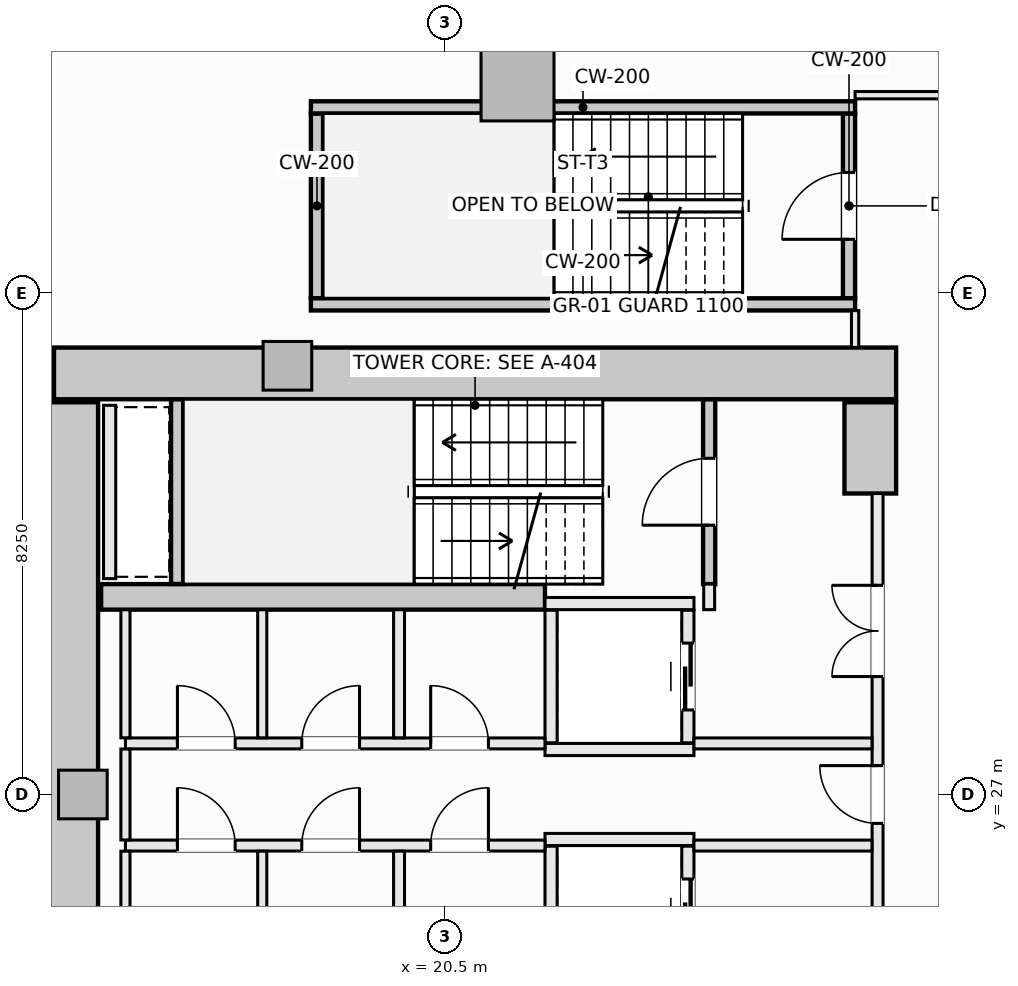
"""IFC4 building model, lengths in metres.
Left out: names, types, materials, properties, quantities, classifications, styles, units other than length and angle.
Written with IfcOpenShell. Run it as: python <this file> out.ifc"""

import sys

from ifc_helpers import new_model, si_unit, direction, frame, frame_2d, origin, origin_2d, place, context, subcontext, project, spatial, rectangle, extrude, element, fill, save


model = new_model("IFC4")
c1 = context("Model", 3, precision=1e-05, world=origin(), true_north=direction((0.0, 1.0)))
c2 = subcontext(c1, "Body", "Model", "MODEL_VIEW")
j1 = project(units=[si_unit("LENGTHUNIT", "METRE"), si_unit("PLANEANGLEUNIT", "RADIAN")], contexts=[c1])
p1 = place(None, origin())
s1 = spatial("IfcSite", under=j1, at=p1, CompositionType="ELEMENT")
p2 = place(p1, origin())
s2 = spatial("IfcBuilding", under=s1, at=p2, CompositionType="ELEMENT")
p3 = place(p2, frame((0.0, 0.0, 72.7)))
s3 = spatial("IfcBuildingStorey", under=s2, at=p3, CompositionType="ELEMENT", Elevation=72.7)
p4 = place(p3, frame((14.075, 33.925, -0.28), z_axis=(0.0, 0.0, 1.0), x_axis=(1.0, 0.0, 0.0)))
e1 = element("IfcWall", 1, at=p4, inside=s3, PredefinedType="SHEAR", context=c2, shape_type="SweptSolid", body=[
    extrude(rectangle(XDim=13.85, YDim=0.85, at=frame_2d((6.925, 0.0))), origin(), (0.0, 0.0, 1.0), 3.85),
])
p5 = place(p3, frame((14.375, 20.55, -0.28), z_axis=(0.0, 0.0, 1.0), x_axis=(0.0, 1.0, 0.0)))
e2 = element("IfcWall", 2, at=p5, inside=s3, PredefinedType="SHEAR", context=c2, shape_type="SweptSolid", body=[
    extrude(rectangle(XDim=12.9, YDim=0.85, at=frame_2d((6.45, 0.0))), origin(), (0.0, 0.0, 1.0), 3.85),
])
p6 = place(p3, frame((27.5, 31.95, -0.28), z_axis=(0.0, 0.0, 1.0), x_axis=(0.0, 1.0, 0.0)))
e3 = element("IfcWall", 3, at=p6, inside=s3, PredefinedType="SHEAR", context=c2, shape_type="SweptSolid", body=[
    extrude(rectangle(XDim=1.5, YDim=0.85, at=frame_2d((0.75, 0.0))), origin(), (0.0, 0.0, 1.0), 3.85),
])
p7 = place(p3, frame((14.85, 30.25, -0.28), z_axis=(0.0, 0.0, 1.0), x_axis=(1.0, 0.0, 0.0)))
e4 = element("IfcWall", 4, at=p7, inside=s3, PredefinedType="SHEAR", context=c2, shape_type="SweptSolid", body=[
    extrude(rectangle(XDim=7.3, YDim=0.42, at=frame_2d((3.65, 0.0))), origin(), (0.0, 0.0, 1.0), 3.85),
])
p8 = place(p3, frame((21.698, 38.677, -0.28), z_axis=(0.0, 0.0, 1.0), x_axis=(1.0, 0.0, 0.0)))
e5 = element("IfcColumn", 5, at=p8, inside=s3, PredefinedType="COLUMN", context=c2, shape_type="SweptSolid", body=[
    extrude(rectangle(XDim=1.2, YDim=1.2, at=origin_2d()), origin(), (0.0, 0.0, 1.0), 3.85),
])
for number, where, z_axis, x_axis in (
    (6, (17.914, 34.05, -0.28), (0.0, 0.0, 1.0), (1.0, 0.0, 0.0)),
    (7, (14.55, 27.0, -0.28), (0.0, 0.0, 1.0), (1.0, 0.0, 0.0)),
):
    element("IfcColumn", number, at=place(p3, frame(where, z_axis=z_axis, x_axis=x_axis)), inside=s3, PredefinedType="PILASTER", context=c2, shape_type="SweptSolid", body=[
        extrude(rectangle(XDim=0.8, YDim=0.8, at=origin_2d()), origin(), (0.0, 0.0, 1.0), 3.85),
    ])
p9 = place(p3, frame((24.85, 30.46, -0.28), z_axis=(0.0, 0.0, 1.0), x_axis=(0.0, 1.0, 0.0)))
e8 = element("IfcWall", 8, at=p9, inside=s3, PredefinedType="SHEAR", context=c2, shape_type="SweptSolid", body=[
    extrude(rectangle(XDim=3.038, YDim=0.2, at=frame_2d((1.519, 0.0))), origin(), (0.0, 0.0, 1.0), 3.85),
])
p10 = place(p9, frame((0.969, 0.0, 0.28)))
e9 = element("IfcOpeningElement", 9, at=p10, cuts=e8, PredefinedType="OPENING", context=c2, shape_type="SweptSolid", body=[
    extrude(rectangle(XDim=1.1, YDim=2.15, at=frame_2d((0.55, 1.075))), frame((0.0, 0.11, 0.0), z_axis=(0.0, -1.0, 0.0), x_axis=(1.0, 0.0, 0.0)), (0.0, 0.0, 1.0), 0.22),
])
p11 = place(p3, frame((16.1, 30.462, -0.28), z_axis=(0.0, 0.0, 1.0), x_axis=(0.0, 1.0, 0.0)))
e10 = element("IfcWall", 10, at=p11, inside=s3, PredefinedType="SHEAR", context=c2, shape_type="SweptSolid", body=[
    extrude(rectangle(XDim=3.036, YDim=0.2, at=frame_2d((1.518, 0.0))), origin(), (0.0, 0.0, 1.0), 3.85),
])
p12 = place(p3, frame((27.15, 35.16, -0.28), z_axis=(0.0, 0.0, 1.0), x_axis=(0.0, 1.0, 0.0)))
e11 = element("IfcWall", 11, at=p12, inside=s3, PredefinedType="SHEAR", context=c2, shape_type="SweptSolid", body=[
    extrude(rectangle(XDim=3.04, YDim=0.2, at=frame_2d((1.52, 0.0))), origin(), (0.0, 0.0, 1.0), 3.85),
])
p13 = place(p12, frame((0.97, 0.0, 0.28)))
e12 = element("IfcOpeningElement", 12, at=p13, cuts=e11, PredefinedType="OPENING", context=c2, shape_type="SweptSolid", body=[
    extrude(rectangle(XDim=1.1, YDim=2.15, at=frame_2d((0.55, 1.075))), frame((0.0, 0.11, 0.0), z_axis=(0.0, -1.0, 0.0), x_axis=(1.0, 0.0, 0.0)), (0.0, 0.0, 1.0), 0.22),
])
p14 = place(p3, frame((18.4, 35.16, -0.28), z_axis=(0.0, 0.0, 1.0), x_axis=(0.0, 1.0, 0.0)))
e13 = element("IfcWall", 13, at=p14, inside=s3, PredefinedType="SHEAR", context=c2, shape_type="SweptSolid", body=[
    extrude(rectangle(XDim=3.04, YDim=0.2, at=frame_2d((1.52, 0.0))), origin(), (0.0, 0.0, 1.0), 3.85),
])
for number, where, z_axis, x_axis in (
    (14, (18.3, 38.3, -0.28), (0.0, 0.0, 1.0), (1.0, 0.0, 0.0)),
    (15, (18.3, 35.06, -0.28), (0.0, 0.0, 1.0), (1.0, 0.0, 0.0)),
):
    element("IfcWall", number, at=place(p3, frame(where, z_axis=z_axis, x_axis=x_axis)), inside=s3, PredefinedType="SHEAR", context=c2, shape_type="SweptSolid", body=[
        extrude(rectangle(XDim=8.95, YDim=0.2, at=frame_2d((4.475, 0.0))), origin(), (0.0, 0.0, 1.0), 3.85),
    ])
for number, where, z_axis, x_axis in (
    (16, (22.15, 30.14, 0.0), (0.0, 0.0, 1.0), (1.0, 0.0, 0.0)),
    (17, (22.15, 27.74, 0.0), (0.0, 0.0, 1.0), (1.0, 0.0, 0.0)),
):
    element("IfcWall", number, at=place(p3, frame(where, z_axis=z_axis, x_axis=x_axis)), inside=s3, PredefinedType="SOLIDWALL", context=c2, shape_type="SweptSolid", body=[
        extrude(rectangle(XDim=2.45, YDim=0.2, at=frame_2d((1.225, 0.0))), origin(), (0.0, 0.0, 1.0), 3.57),
    ])
p15 = place(p3, frame((22.25, 27.85, 0.0), z_axis=(0.0, 0.0, 1.0), x_axis=(0.0, 1.0, 0.0)))
e18 = element("IfcWall", 18, at=p15, inside=s3, PredefinedType="SOLIDWALL", context=c2, shape_type="SweptSolid", body=[
    extrude(rectangle(XDim=2.18, YDim=0.2, at=frame_2d((1.09, 0.0))), origin(), (0.0, 0.0, 1.0), 3.57),
])
p16 = place(p3, frame((24.5, 27.85, 0.0), z_axis=(0.0, 0.0, 1.0), x_axis=(0.0, 1.0, 0.0)))
e19 = element("IfcWall", 19, at=p16, inside=s3, PredefinedType="SOLIDWALL", context=c2, shape_type="SweptSolid", body=[
    extrude(rectangle(XDim=2.18, YDim=0.2, at=frame_2d((1.09, 0.0))), origin(), (0.0, 0.0, 1.0), 3.57),
])
p17 = place(p16, frame((0.54, 0.0, 0.0)))
e20 = element("IfcOpeningElement", 20, at=p17, cuts=e19, PredefinedType="OPENING", context=c2, shape_type="SweptSolid", body=[
    extrude(rectangle(XDim=1.1, YDim=2.2, at=frame_2d((0.55, 1.1))), frame((0.0, 0.11, 0.0), z_axis=(0.0, -1.0, 0.0), x_axis=(1.0, 0.0, 0.0)), (0.0, 0.0, 1.0), 0.22),
])
p18 = place(p3, frame((22.15, 26.26, 0.0), z_axis=(0.0, 0.0, 1.0), x_axis=(1.0, 0.0, 0.0)))
e21 = element("IfcWall", 21, at=p18, inside=s3, PredefinedType="SOLIDWALL", context=c2, shape_type="SweptSolid", body=[
    extrude(rectangle(XDim=2.45, YDim=0.2, at=frame_2d((1.225, 0.0))), origin(), (0.0, 0.0, 1.0), 3.57),
])
p19 = place(p3, frame((22.25, 23.97, 0.0), z_axis=(0.0, 0.0, 1.0), x_axis=(0.0, 1.0, 0.0)))
e22 = element("IfcWall", 22, at=p19, inside=s3, PredefinedType="SOLIDWALL", context=c2, shape_type="SweptSolid", body=[
    extrude(rectangle(XDim=2.18, YDim=0.2, at=frame_2d((1.09, 0.0))), origin(), (0.0, 0.0, 1.0), 3.57),
])
p20 = place(p3, frame((24.5, 23.97, 0.0), z_axis=(0.0, 0.0, 1.0), x_axis=(0.0, 1.0, 0.0)))
e23 = element("IfcWall", 23, at=p20, inside=s3, PredefinedType="SOLIDWALL", context=c2, shape_type="SweptSolid", body=[
    extrude(rectangle(XDim=2.18, YDim=0.2, at=frame_2d((1.09, 0.0))), origin(), (0.0, 0.0, 1.0), 3.57),
])
p21 = place(p20, frame((0.54, 0.0, 0.0)))
e24 = element("IfcOpeningElement", 24, at=p21, cuts=e23, PredefinedType="OPENING", context=c2, shape_type="SweptSolid", body=[
    extrude(rectangle(XDim=1.1, YDim=2.2, at=frame_2d((0.55, 1.1))), frame((0.0, 0.11, 0.0), z_axis=(0.0, -1.0, 0.0), x_axis=(1.0, 0.0, 0.0)), (0.0, 0.0, 1.0), 0.22),
])
p22 = place(p3, frame((14.99, 30.55, 0.0), z_axis=(0.0, 0.0, 1.0), x_axis=(0.0, 1.0, 0.0)))
e25 = element("IfcWall", 25, at=p22, inside=s3, PredefinedType="SOLIDWALL", context=c2, shape_type="SweptSolid", body=[
    extrude(rectangle(XDim=2.85, YDim=0.2, at=frame_2d((1.425, 0.0))), origin(), (0.0, 0.0, 1.0), 3.57),
])
p23 = place(p3, frame((24.85, 30.04, 0.0), z_axis=(0.0, 0.0, 1.0), x_axis=(0.0, 1.0, 0.0)))
e26 = element("IfcWall", 26, at=p23, inside=s3, PredefinedType="SOLIDWALL", context=c2, shape_type="SweptSolid", body=[
    extrude(rectangle(XDim=0.42, YDim=0.18, at=frame_2d((0.21, 0.0))), origin(), (0.0, 0.0, 1.0), 3.57),
])
p24 = place(p3, frame((27.62, 22.05, 0.0), z_axis=(0.0, 0.0, 1.0), x_axis=(0.0, 1.0, 0.0)))
e27 = element("IfcWall", 27, at=p24, inside=s3, PredefinedType="SOLIDWALL", context=c2, shape_type="SweptSolid", body=[
    extrude(rectangle(XDim=9.9, YDim=0.18, at=frame_2d((4.95, 0.0))), origin(), (0.0, 0.0, 1.0), 2.662),
])
p25 = place(p24, frame((4.475, 0.0, 0.0)))
e28 = element("IfcOpeningElement", 28, at=p25, cuts=e27, PredefinedType="OPENING", context=c2, shape_type="SweptSolid", body=[
    extrude(rectangle(XDim=0.95, YDim=2.1, at=frame_2d((0.475, 1.05))), frame((0.0, 0.1, 0.0), z_axis=(0.0, -1.0, 0.0), x_axis=(1.0, 0.0, 0.0)), (0.0, 0.0, 1.0), 0.2),
])
p26 = place(p24, frame((6.89, 0.0, 0.0)))
e29 = element("IfcOpeningElement", 29, at=p26, cuts=e27, PredefinedType="OPENING", context=c2, shape_type="SweptSolid", body=[
    extrude(rectangle(XDim=1.5, YDim=2.2, at=frame_2d((0.75, 1.1))), frame((0.0, 0.1, 0.0), z_axis=(0.0, -1.0, 0.0), x_axis=(1.0, 0.0, 0.0)), (0.0, 0.0, 1.0), 0.2),
])
p27 = place(p24, frame((1.51, 0.0, 0.0)))
e30 = element("IfcOpeningElement", 30, at=p27, cuts=e27, PredefinedType="OPENING", context=c2, shape_type="SweptSolid", body=[
    extrude(rectangle(XDim=1.5, YDim=2.2, at=frame_2d((0.75, 1.1))), frame((0.0, 0.1, 0.0), z_axis=(0.0, -1.0, 0.0), x_axis=(1.0, 0.0, 0.0)), (0.0, 0.0, 1.0), 0.2),
])
p28 = place(p3, frame((15.25, 27.84, 0.0), z_axis=(0.0, 0.0, 1.0), x_axis=(1.0, 0.0, 0.0)))
e31 = element("IfcWall", 31, at=p28, inside=s3, PredefinedType="SOLIDWALL", context=c2, shape_type="SweptSolid", body=[
    extrude(rectangle(XDim=6.9, YDim=0.18, at=frame_2d((3.45, 0.0))), origin(), (0.0, 0.0, 1.0), 3.57),
])
p29 = place(p28, frame((5.02, 0.0, 0.0)))
e32 = element("IfcOpeningElement", 32, at=p29, cuts=e31, PredefinedType="OPENING", context=c2, shape_type="SweptSolid", body=[
    extrude(rectangle(XDim=0.95, YDim=2.1, at=frame_2d((0.475, 1.05))), frame((0.0, 0.1, 0.0), z_axis=(0.0, -1.0, 0.0), x_axis=(1.0, 0.0, 0.0)), (0.0, 0.0, 1.0), 0.2),
])
p30 = place(p28, frame((0.855, 0.0, 0.0)))
e33 = element("IfcOpeningElement", 33, at=p30, cuts=e31, PredefinedType="OPENING", context=c2, shape_type="SweptSolid", body=[
    extrude(rectangle(XDim=0.95, YDim=2.1, at=frame_2d((0.475, 1.05))), frame((0.0, 0.1, 0.0), z_axis=(0.0, -1.0, 0.0), x_axis=(1.0, 0.0, 0.0)), (0.0, 0.0, 1.0), 0.2),
])
p31 = place(p28, frame((2.9, 0.0, 0.0)))
e34 = element("IfcOpeningElement", 34, at=p31, cuts=e31, PredefinedType="OPENING", context=c2, shape_type="SweptSolid", body=[
    extrude(rectangle(XDim=0.95, YDim=2.1, at=frame_2d((0.475, 1.05))), frame((0.0, 0.1, 0.0), z_axis=(0.0, -1.0, 0.0), x_axis=(1.0, 0.0, 0.0)), (0.0, 0.0, 1.0), 0.2),
])
p32 = place(p3, frame((24.6, 27.84, 0.0), z_axis=(0.0, 0.0, 1.0), x_axis=(1.0, 0.0, 0.0)))
e35 = element("IfcWall", 35, at=p32, inside=s3, PredefinedType="SOLIDWALL", context=c2, shape_type="SweptSolid", body=[
    extrude(rectangle(XDim=2.928, YDim=0.18, at=frame_2d((1.464, 0.0))), origin(), (0.0, 0.0, 1.0), 3.57),
])
p33 = place(p3, frame((15.25, 26.16, 0.0), z_axis=(0.0, 0.0, 1.0), x_axis=(1.0, 0.0, 0.0)))
e36 = element("IfcWall", 36, at=p33, inside=s3, PredefinedType="SOLIDWALL", context=c2, shape_type="SweptSolid", body=[
    extrude(rectangle(XDim=6.9, YDim=0.18, at=frame_2d((3.45, 0.0))), origin(), (0.0, 0.0, 1.0), 3.57),
])
p34 = place(p33, frame((5.02, 0.0, 0.0)))
e37 = element("IfcOpeningElement", 37, at=p34, cuts=e36, PredefinedType="OPENING", context=c2, shape_type="SweptSolid", body=[
    extrude(rectangle(XDim=0.95, YDim=2.1, at=frame_2d((0.475, 1.05))), frame((0.0, 0.1, 0.0), z_axis=(0.0, -1.0, 0.0), x_axis=(1.0, 0.0, 0.0)), (0.0, 0.0, 1.0), 0.2),
])
p35 = place(p33, frame((0.855, 0.0, 0.0)))
e38 = element("IfcOpeningElement", 38, at=p35, cuts=e36, PredefinedType="OPENING", context=c2, shape_type="SweptSolid", body=[
    extrude(rectangle(XDim=0.95, YDim=2.1, at=frame_2d((0.475, 1.05))), frame((0.0, 0.1, 0.0), z_axis=(0.0, -1.0, 0.0), x_axis=(1.0, 0.0, 0.0)), (0.0, 0.0, 1.0), 0.2),
])
p36 = place(p33, frame((2.9, 0.0, 0.0)))
e39 = element("IfcOpeningElement", 39, at=p36, cuts=e36, PredefinedType="OPENING", context=c2, shape_type="SweptSolid", body=[
    extrude(rectangle(XDim=0.95, YDim=2.1, at=frame_2d((0.475, 1.05))), frame((0.0, 0.1, 0.0), z_axis=(0.0, -1.0, 0.0), x_axis=(1.0, 0.0, 0.0)), (0.0, 0.0, 1.0), 0.2),
])
p37 = place(p3, frame((24.6, 26.16, 0.0), z_axis=(0.0, 0.0, 1.0), x_axis=(1.0, 0.0, 0.0)))
e40 = element("IfcWall", 40, at=p37, inside=s3, PredefinedType="SOLIDWALL", context=c2, shape_type="SweptSolid", body=[
    extrude(rectangle(XDim=2.928, YDim=0.18, at=frame_2d((1.464, 0.0))), origin(), (0.0, 0.0, 1.0), 3.57),
])
p38 = place(p3, frame((15.25, 23.962, 0.0), z_axis=(0.0, 0.0, 1.0), x_axis=(0.0, 1.0, 0.0)))
e41 = element("IfcWall", 41, at=p38, inside=s3, PredefinedType="PARTITIONING", context=c2, shape_type="SweptSolid", body=[
    extrude(rectangle(XDim=2.106, YDim=0.15, at=frame_2d((1.053, 0.0))), origin(), (0.0, 0.0, 1.0), 3.57),
])
p39 = place(p3, frame((15.25, 26.252, 0.0), z_axis=(0.0, 0.0, 1.0), x_axis=(0.0, 1.0, 0.0)))
e42 = element("IfcWall", 42, at=p39, inside=s3, PredefinedType="PARTITIONING", context=c2, shape_type="SweptSolid", body=[
    extrude(rectangle(XDim=1.496, YDim=0.15, at=frame_2d((0.748, 0.0))), origin(), (0.0, 0.0, 1.0), 3.57),
])
p40 = place(p3, frame((15.25, 27.932, 0.0), z_axis=(0.0, 0.0, 1.0), x_axis=(0.0, 1.0, 0.0)))
e43 = element("IfcWall", 43, at=p40, inside=s3, PredefinedType="PARTITIONING", context=c2, shape_type="SweptSolid", body=[
    extrude(rectangle(XDim=2.106, YDim=0.15, at=frame_2d((1.053, 0.0))), origin(), (0.0, 0.0, 1.0), 3.57),
])
for number, where, z_axis, x_axis in (
    (44, (19.75, 23.962, 0.0), (0.0, 0.0, 1.0), (0.0, 1.0, 0.0)),
    (45, (19.75, 27.932, 0.0), (0.0, 0.0, 1.0), (0.0, 1.0, 0.0)),
):
    element("IfcWall", number, at=place(p3, frame(where, z_axis=z_axis, x_axis=x_axis)), inside=s3, PredefinedType="SOLIDWALL", context=c2, shape_type="SweptSolid", body=[
        extrude(rectangle(XDim=2.106, YDim=0.18, at=frame_2d((1.053, 0.0))), origin(), (0.0, 0.0, 1.0), 3.57),
    ])
for number, where, z_axis, x_axis in (
    (46, (17.5, 23.962, 0.0), (0.0, 0.0, 1.0), (0.0, 1.0, 0.0)),
    (47, (17.5, 27.932, 0.0), (0.0, 0.0, 1.0), (0.0, 1.0, 0.0)),
):
    element("IfcWall", number, at=place(p3, frame(where, z_axis=z_axis, x_axis=x_axis)), inside=s3, PredefinedType="PARTITIONING", context=c2, shape_type="SweptSolid", body=[
        extrude(rectangle(XDim=2.106, YDim=0.15, at=frame_2d((1.053, 0.0))), origin(), (0.0, 0.0, 1.0), 3.57),
    ])
p41 = place(p3, frame((27.25, 34.352, 0.0), z_axis=(0.0, 0.0, 1.0), x_axis=(0.0, 1.0, 0.0)))
e48 = element("IfcWall", 48, at=p41, inside=s3, PredefinedType="PARTITIONING", context=c2, shape_type="SweptSolid", body=[
    extrude(rectangle(XDim=0.606, YDim=0.12, at=frame_2d((0.303, 0.0))), origin(), (0.0, 0.0, 1.0), 3.57),
])
p42 = place(p3, frame((27.25, 38.5, 0.0), z_axis=(0.0, 0.0, 1.0), x_axis=(1.0, 0.0, 0.0)))
e49 = element("IfcWall", 49, at=p42, inside=s3, PredefinedType="PARTITIONING", context=c2, shape_type="SweptSolid", body=[
    extrude(rectangle(XDim=2.53, YDim=0.12, at=frame_2d((1.265, 0.0))), origin(), (0.0, 0.0, 1.0), 3.57),
])
p43 = place(p10, origin())
e50 = element("IfcDoor", 50, at=p43, inside=s3, OperationType="SINGLE_SWING_LEFT", PredefinedType="DOOR", context=c2, shape_type="SweptSolid", body=[
    extrude(rectangle(XDim=1.1, YDim=2.15, at=frame_2d((0.55, 1.075))), frame((0.0, 0.025, 0.0), z_axis=(0.0, -1.0, 0.0), x_axis=(1.0, 0.0, 0.0)), (0.0, 0.0, 1.0), 0.05),
])
fill(e9, e50)
p44 = place(p13, origin())
e51 = element("IfcDoor", 51, at=p44, inside=s3, OperationType="SINGLE_SWING_LEFT", PredefinedType="DOOR", context=c2, shape_type="SweptSolid", body=[
    extrude(rectangle(XDim=1.1, YDim=2.15, at=frame_2d((0.55, 1.075))), frame((0.0, 0.025, 0.0), z_axis=(0.0, -1.0, 0.0), x_axis=(1.0, 0.0, 0.0)), (0.0, 0.0, 1.0), 0.05),
])
fill(e12, e51)
p45 = place(p17, origin())
e52 = element("IfcDoor", 52, at=p45, inside=s3, OperationType="SLIDING_TO_LEFT", PredefinedType="DOOR", context=c2, shape_type="SweptSolid", body=[
    extrude(rectangle(XDim=1.1, YDim=2.2, at=frame_2d((0.55, 1.1))), frame((0.0, 0.025, 0.0), z_axis=(0.0, -1.0, 0.0), x_axis=(1.0, 0.0, 0.0)), (0.0, 0.0, 1.0), 0.05),
])
fill(e20, e52)
p46 = place(p21, origin())
e53 = element("IfcDoor", 53, at=p46, inside=s3, OperationType="SLIDING_TO_LEFT", PredefinedType="DOOR", context=c2, shape_type="SweptSolid", body=[
    extrude(rectangle(XDim=1.1, YDim=2.2, at=frame_2d((0.55, 1.1))), frame((0.0, 0.025, 0.0), z_axis=(0.0, -1.0, 0.0), x_axis=(1.0, 0.0, 0.0)), (0.0, 0.0, 1.0), 0.05),
])
fill(e24, e53)
p47 = place(p25, origin())
e54 = element("IfcDoor", 54, at=p47, inside=s3, OperationType="SINGLE_SWING_RIGHT", PredefinedType="DOOR", context=c2, shape_type="SweptSolid", body=[
    extrude(rectangle(XDim=0.95, YDim=2.1, at=frame_2d((0.475, 1.05))), frame((0.0, 0.025, 0.0), z_axis=(0.0, -1.0, 0.0), x_axis=(1.0, 0.0, 0.0)), (0.0, 0.0, 1.0), 0.05),
])
fill(e28, e54)
p48 = place(p26, origin())
e55 = element("IfcDoor", 55, at=p48, inside=s3, OperationType="DOUBLE_DOOR_SINGLE_SWING", PredefinedType="DOOR", context=c2, shape_type="SweptSolid", body=[
    extrude(rectangle(XDim=1.5, YDim=2.2, at=frame_2d((0.75, 1.1))), frame((0.0, 0.025, 0.0), z_axis=(0.0, -1.0, 0.0), x_axis=(1.0, 0.0, 0.0)), (0.0, 0.0, 1.0), 0.05),
])
fill(e29, e55)
p49 = place(p29, origin())
e56 = element("IfcDoor", 56, at=p49, inside=s3, OperationType="SINGLE_SWING_LEFT", PredefinedType="DOOR", context=c2, shape_type="SweptSolid", body=[
    extrude(rectangle(XDim=0.95, YDim=2.1, at=frame_2d((0.475, 1.05))), frame((0.0, 0.025, 0.0), z_axis=(0.0, -1.0, 0.0), x_axis=(1.0, 0.0, 0.0)), (0.0, 0.0, 1.0), 0.05),
])
fill(e32, e56)
p50 = place(p34, origin())
e57 = element("IfcDoor", 57, at=p50, inside=s3, OperationType="SINGLE_SWING_RIGHT", PredefinedType="DOOR", context=c2, shape_type="SweptSolid", body=[
    extrude(rectangle(XDim=0.95, YDim=2.1, at=frame_2d((0.475, 1.05))), frame((0.0, 0.025, 0.0), z_axis=(0.0, -1.0, 0.0), x_axis=(1.0, 0.0, 0.0)), (0.0, 0.0, 1.0), 0.05),
])
fill(e37, e57)
p51 = place(p30, origin())
e58 = element("IfcDoor", 58, at=p51, inside=s3, OperationType="SINGLE_SWING_LEFT", PredefinedType="DOOR", context=c2, shape_type="SweptSolid", body=[
    extrude(rectangle(XDim=0.95, YDim=2.1, at=frame_2d((0.475, 1.05))), frame((0.0, 0.025, 0.0), z_axis=(0.0, -1.0, 0.0), x_axis=(1.0, 0.0, 0.0)), (0.0, 0.0, 1.0), 0.05),
])
fill(e33, e58)
p52 = place(p31, origin())
e59 = element("IfcDoor", 59, at=p52, inside=s3, OperationType="SINGLE_SWING_RIGHT", PredefinedType="DOOR", context=c2, shape_type="SweptSolid", body=[
    extrude(rectangle(XDim=0.95, YDim=2.1, at=frame_2d((0.475, 1.05))), frame((0.0, 0.025, 0.0), z_axis=(0.0, -1.0, 0.0), x_axis=(1.0, 0.0, 0.0)), (0.0, 0.0, 1.0), 0.05),
])
fill(e34, e59)
p53 = place(p35, origin())
e60 = element("IfcDoor", 60, at=p53, inside=s3, OperationType="SINGLE_SWING_LEFT", PredefinedType="DOOR", context=c2, shape_type="SweptSolid", body=[
    extrude(rectangle(XDim=0.95, YDim=2.1, at=frame_2d((0.475, 1.05))), frame((0.0, 0.025, 0.0), z_axis=(0.0, -1.0, 0.0), x_axis=(1.0, 0.0, 0.0)), (0.0, 0.0, 1.0), 0.05),
])
fill(e38, e60)
p54 = place(p36, origin())
e61 = element("IfcDoor", 61, at=p54, inside=s3, OperationType="SINGLE_SWING_RIGHT", PredefinedType="DOOR", context=c2, shape_type="SweptSolid", body=[
    extrude(rectangle(XDim=0.95, YDim=2.1, at=frame_2d((0.475, 1.05))), frame((0.0, 0.025, 0.0), z_axis=(0.0, -1.0, 0.0), x_axis=(1.0, 0.0, 0.0)), (0.0, 0.0, 1.0), 0.05),
])
fill(e39, e61)
save(model, sys.argv[1])
